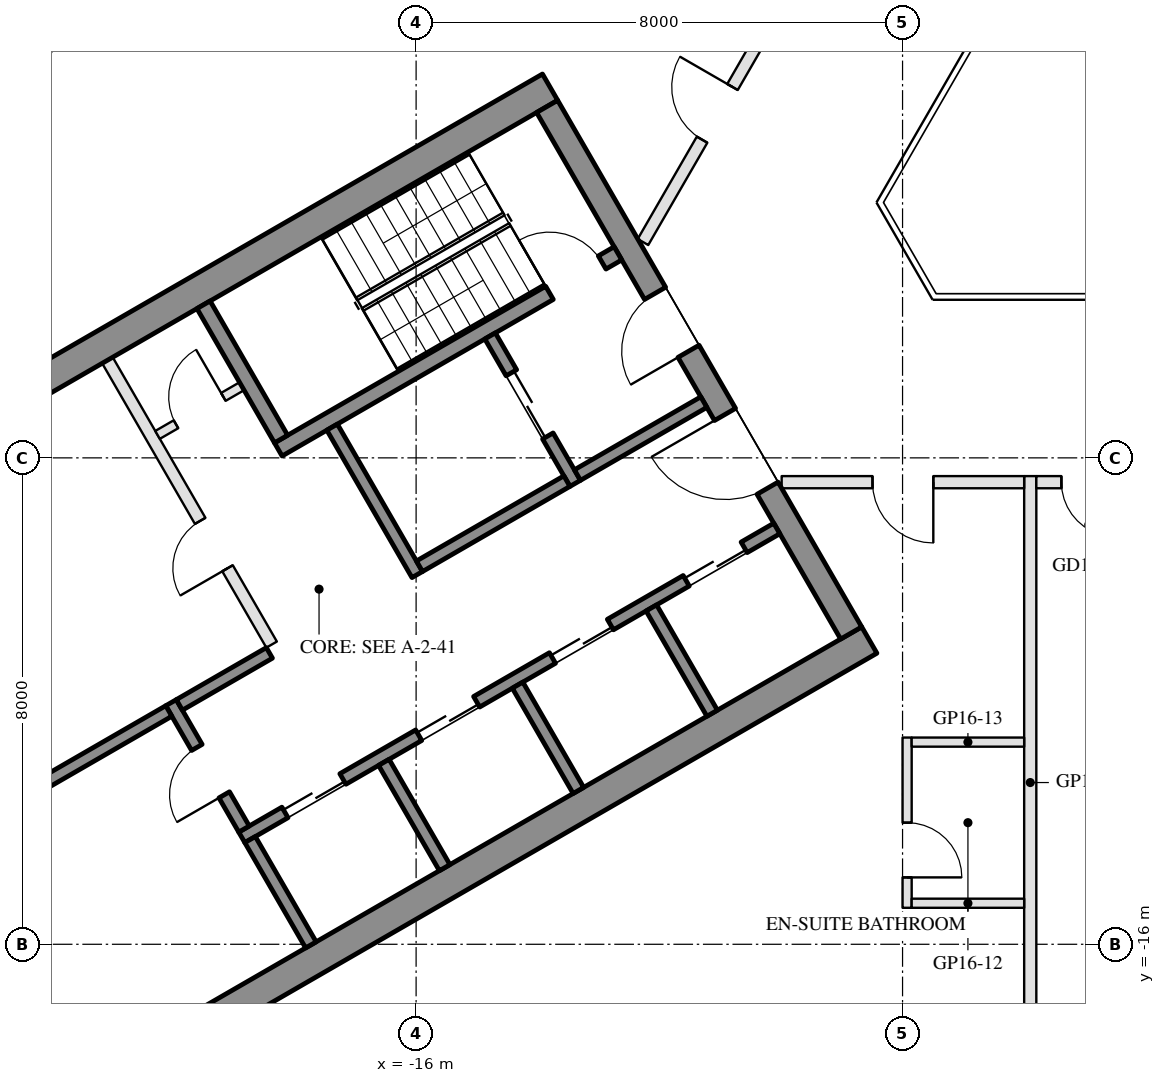
"""IFC4 building model, lengths in metres.
Left out: names, types, materials, properties, quantities, classifications, styles, units other than length and angle.
Written with IfcOpenShell. Run it as: python <this file> out.ifc"""

import sys

from ifc_helpers import new_model, si_unit, direction, frame, frame_2d, origin, place, context, subcontext, project, spatial, rectangle, extrude, element, fill, save


model = new_model("IFC4")
c1 = context("Model", 3, precision=1e-05, world=origin(), true_north=direction((0.0, 1.0)))
c2 = subcontext(c1, "Body", "Model", "MODEL_VIEW")
j1 = project(units=[si_unit("LENGTHUNIT", "METRE"), si_unit("PLANEANGLEUNIT", "RADIAN")], contexts=[c1])
p1 = place(None, origin())
s1 = spatial("IfcSite", under=j1, at=p1, CompositionType="ELEMENT")
p2 = place(p1, origin())
s2 = spatial("IfcBuilding", under=s1, at=p2, CompositionType="ELEMENT")
p3 = place(p2, frame((0.0, 0.0, 176.2)))
s3 = spatial("IfcBuildingStorey", under=s2, at=p3, CompositionType="ELEMENT", Elevation=176.2)
p4 = place(p3, frame((-20.309, 1.934, 0.0), z_axis=(0.0, 0.0, 1.0), x_axis=(-0.499992114976, -0.866029956157, 0.0)))
e1 = element("IfcWall", 1, at=p4, inside=s3, PredefinedType="SOLIDWALL", context=c2, shape_type="SweptSolid", body=[
    extrude(rectangle(XDim=6.74, YDim=0.35, at=frame_2d((3.37, 0.0))), origin(), (0.0, 0.0, 1.0), 3.55),
])
p5 = place(p4, frame((0.77, 0.0, 0.0)))
e2 = element("IfcOpeningElement", 2, at=p5, cuts=e1, PredefinedType="OPENING", context=c2, shape_type="SweptSolid", body=[
    extrude(rectangle(XDim=2.4, YDim=2.4, at=frame_2d((1.2, 1.2))), frame((0.0, 0.185, 0.0), z_axis=(0.0, -1.0, 0.0), x_axis=(1.0, 0.0, 0.0)), (0.0, 0.0, 1.0), 0.37),
])
p6 = place(p4, frame((3.47, 0.0, 0.3)))
e3 = element("IfcOpeningElement", 3, at=p6, cuts=e1, PredefinedType="OPENING", context=c2, shape_type="SweptSolid", body=[
    extrude(rectangle(XDim=2.9, YDim=2.65, at=frame_2d((1.45, 1.325))), frame((0.0, 0.185, 0.0), z_axis=(0.0, -1.0, 0.0), x_axis=(1.0, 0.0, 0.0)), (0.0, 0.0, 1.0), 0.37),
])
for number, where, z_axis, x_axis in (
    (4, (-13.797, -1.903, 0.0), (0.0, 0.0, 1.0), (-0.866, -0.5, 0.0)),
    (5, (-8.547, -10.997, 0.0), (0.0, 0.0, 1.0), (-0.866, -0.5, 0.0)),
):
    element("IfcWall", number, at=place(p3, frame(where, z_axis=z_axis, x_axis=x_axis)), inside=s3, PredefinedType="SHEAR", context=c2, shape_type="SweptSolid", body=[
        extrude(rectangle(XDim=14.837, YDim=0.5, at=frame_2d((7.418, 0.0))), origin(), (0.0, 0.0, 1.0), 3.5),
    ])
p7 = place(p3, frame((-13.845, -2.22, 0.0), z_axis=(0.0, 0.0, 1.0), x_axis=(0.500004234368, -0.866022959057, 0.0)))
e6 = element("IfcWall", 6, at=p7, inside=s3, PredefinedType="SHEAR", context=c2, shape_type="SweptSolid", body=[
    extrude(rectangle(XDim=10.0, YDim=0.4, at=frame_2d((5.0, 0.0))), origin(), (0.0, 0.0, 1.0), 3.5),
])
p8 = place(p7, frame((3.55, 0.0, 0.0)))
e7 = element("IfcOpeningElement", 7, at=p8, cuts=e6, PredefinedType="OPENING", context=c2, shape_type="SweptSolid", body=[
    extrude(rectangle(XDim=1.1, YDim=2.1, at=frame_2d((0.55, 1.05))), frame((0.0, 0.21, 0.0), z_axis=(0.0, -1.0, 0.0), x_axis=(1.0, 0.0, 0.0)), (0.0, 0.0, 1.0), 0.42),
])
p9 = place(p7, frame((5.85, 0.0, 0.0)))
e8 = element("IfcOpeningElement", 8, at=p9, cuts=e6, PredefinedType="OPENING", context=c2, shape_type="SweptSolid", body=[
    extrude(rectangle(XDim=1.4, YDim=2.1, at=frame_2d((0.7, 1.05))), frame((0.0, 0.21, 0.0), z_axis=(0.0, -1.0, 0.0), x_axis=(1.0, 0.0, 0.0)), (0.0, 0.0, 1.0), 0.42),
])
p10 = place(p3, frame((-12.681, -4.636, 0.0), z_axis=(0.0, 0.0, 1.0), x_axis=(-0.866021702275, -0.500006411147, 0.0)))
e9 = element("IfcWall", 9, at=p10, inside=s3, PredefinedType="SHEAR", context=c2, shape_type="SweptSolid", body=[
    extrude(rectangle(XDim=6.45, YDim=0.25, at=frame_2d((3.225, 0.0))), origin(), (0.0, 0.0, 1.0), 3.5),
])
p11 = place(p10, frame((0.3, 0.0, 0.0)))
e10 = element("IfcOpeningElement", 10, at=p11, cuts=e9, PredefinedType="OPENING", context=c2, shape_type="SweptSolid", body=[
    extrude(rectangle(XDim=1.0, YDim=2.1, at=frame_2d((0.5, 1.05))), frame((0.0, 0.135, 0.0), z_axis=(0.0, -1.0, 0.0), x_axis=(1.0, 0.0, 0.0)), (0.0, 0.0, 1.0), 0.27),
])
p12 = place(p3, frame((-19.496, -5.482, 0.0), z_axis=(0.0, 0.0, 1.0), x_axis=(0.499990435942, -0.866030925526, 0.0)))
e11 = element("IfcWall", 11, at=p12, inside=s3, PredefinedType="SHEAR", context=c2, shape_type="SweptSolid", body=[
    extrude(rectangle(XDim=2.55, YDim=0.25, at=frame_2d((1.275, 0.0))), origin(), (0.0, 0.0, 1.0), 3.5),
])
p13 = place(p3, frame((-17.381, -7.495, 0.0), z_axis=(0.0, 0.0, 1.0), x_axis=(0.500011755427, -0.866018616679, 0.0)))
e12 = element("IfcWall", 12, at=p13, inside=s3, PredefinedType="SHEAR", context=c2, shape_type="SweptSolid", body=[
    extrude(rectangle(XDim=2.8, YDim=0.2, at=frame_2d((1.4, 0.0))), origin(), (0.0, 0.0, 1.0), 3.5),
])
p14 = place(p3, frame((-14.783, -5.995, 0.0), z_axis=(0.0, 0.0, 1.0), x_axis=(0.49994636267, -0.866056369097, 0.0)))
e13 = element("IfcWall", 13, at=p14, inside=s3, PredefinedType="SHEAR", context=c2, shape_type="SweptSolid", body=[
    extrude(rectangle(XDim=2.8, YDim=0.2, at=frame_2d((1.4, 0.0))), origin(), (0.0, 0.0, 1.0), 3.5),
])
p15 = place(p14, frame((0.7, 0.0, 0.0)))
e14 = element("IfcOpeningElement", 14, at=p15, cuts=e13, PredefinedType="OPENING", context=c2, shape_type="SweptSolid", body=[
    extrude(rectangle(XDim=1.2, YDim=2.1, at=frame_2d((0.6, 1.05))), frame((0.0, 0.11, 0.0), z_axis=(0.0, -1.0, 0.0), x_axis=(1.0, 0.0, 0.0)), (0.0, 0.0, 1.0), 0.22),
])
p16 = place(p3, frame((-13.52, -8.383, 0.0), z_axis=(0.0, 0.0, 1.0), x_axis=(-0.866034573852, -0.49998411664, 0.0)))
e15 = element("IfcWall", 15, at=p16, inside=s3, PredefinedType="SHEAR", context=c2, shape_type="SweptSolid", body=[
    extrude(rectangle(XDim=2.8, YDim=0.2, at=frame_2d((1.4, 0.0))), origin(), (0.0, 0.0, 1.0), 3.5),
])
p17 = place(p3, frame((-11.268, -7.083, 0.0), z_axis=(0.0, 0.0, 1.0), x_axis=(-0.866050077142, -0.499957262057, 0.0)))
e16 = element("IfcWall", 16, at=p17, inside=s3, PredefinedType="SHEAR", context=c2, shape_type="SweptSolid", body=[
    extrude(rectangle(XDim=2.4, YDim=0.2, at=frame_2d((1.2, 0.0))), origin(), (0.0, 0.0, 1.0), 3.5),
])
p18 = place(p3, frame((-10.068, -9.162, 0.0), z_axis=(0.0, 0.0, 1.0), x_axis=(-0.866032725843, -0.499987317609, 0.0)))
e17 = element("IfcWall", 17, at=p18, inside=s3, PredefinedType="SHEAR", context=c2, shape_type="SweptSolid", body=[
    extrude(rectangle(XDim=10.16, YDim=0.2, at=frame_2d((5.08, 0.0))), origin(), (0.0, 0.0, 1.0), 3.5),
])
p19 = place(p18, frame((0.62, 0.0, 0.0)))
e18 = element("IfcOpeningElement", 18, at=p19, cuts=e17, PredefinedType="OPENING", context=c2, shape_type="SweptSolid", body=[
    extrude(rectangle(XDim=1.1, YDim=2.1, at=frame_2d((0.55, 1.05))), frame((0.0, 0.11, 0.0), z_axis=(0.0, -1.0, 0.0), x_axis=(1.0, 0.0, 0.0)), (0.0, 0.0, 1.0), 0.22),
])
p20 = place(p18, frame((3.16, 0.0, 0.0)))
e19 = element("IfcOpeningElement", 19, at=p20, cuts=e17, PredefinedType="OPENING", context=c2, shape_type="SweptSolid", body=[
    extrude(rectangle(XDim=1.1, YDim=2.1, at=frame_2d((0.55, 1.05))), frame((0.0, 0.11, 0.0), z_axis=(0.0, -1.0, 0.0), x_axis=(1.0, 0.0, 0.0)), (0.0, 0.0, 1.0), 0.22),
])
p21 = place(p18, frame((5.7, 0.0, 0.0)))
e20 = element("IfcOpeningElement", 20, at=p21, cuts=e17, PredefinedType="OPENING", context=c2, shape_type="SweptSolid", body=[
    extrude(rectangle(XDim=1.1, YDim=2.1, at=frame_2d((0.55, 1.05))), frame((0.0, 0.11, 0.0), z_axis=(0.0, -1.0, 0.0), x_axis=(1.0, 0.0, 0.0)), (0.0, 0.0, 1.0), 0.22),
])
p22 = place(p18, frame((8.24, 0.0, 0.0)))
e21 = element("IfcOpeningElement", 21, at=p22, cuts=e17, PredefinedType="OPENING", context=c2, shape_type="SweptSolid", body=[
    extrude(rectangle(XDim=1.1, YDim=2.1, at=frame_2d((0.55, 1.05))), frame((0.0, 0.11, 0.0), z_axis=(0.0, -1.0, 0.0), x_axis=(1.0, 0.0, 0.0)), (0.0, 0.0, 1.0), 0.22),
])
p23 = place(p3, frame((-20.031, -12.026, 0.0), z_axis=(0.0, 0.0, 1.0), x_axis=(0.500033551112, -0.866006032174, 0.0)))
e22 = element("IfcWall", 22, at=p23, inside=s3, PredefinedType="SHEAR", context=c2, shape_type="SweptSolid", body=[
    extrude(rectangle(XDim=2.4, YDim=0.2, at=frame_2d((1.2, 0.0))), origin(), (0.0, 0.0, 1.0), 3.5),
])
p24 = place(p23, frame((0.85, 0.0, 0.0)))
e23 = element("IfcOpeningElement", 23, at=p24, cuts=e22, PredefinedType="OPENING", context=c2, shape_type="SweptSolid", body=[
    extrude(rectangle(XDim=0.9, YDim=2.1, at=frame_2d((0.45, 1.05))), frame((0.0, 0.11, 0.0), z_axis=(0.0, -1.0, 0.0), x_axis=(1.0, 0.0, 0.0)), (0.0, 0.0, 1.0), 0.22),
])
p25 = place(p3, frame((-18.413, -11.208, 0.0), z_axis=(0.0, 0.0, 1.0), x_axis=(-0.866038183914, -0.499977863513, 0.0)))
e24 = element("IfcWall", 24, at=p25, inside=s3, PredefinedType="SHEAR", context=c2, shape_type="SweptSolid", body=[
    extrude(rectangle(XDim=1.71, YDim=0.2, at=frame_2d((0.855, 0.0))), origin(), (0.0, 0.0, 1.0), 3.5),
])
for number, where, z_axis, x_axis in (
    (25, (-12.131, -10.468, 0.0), (0.0, 0.0, 1.0), (0.5, -0.866, 0.0)),
    (26, (-14.331, -11.738, 0.0), (0.0, 0.0, 1.0), (0.5, -0.866, 0.0)),
    (27, (-16.531, -13.008, 0.0), (0.0, 0.0, 1.0), (0.5, -0.866, 0.0)),
    (28, (-18.73, -14.278, 0.0), (0.0, 0.0, 1.0), (0.5, -0.866, 0.0)),
):
    element("IfcWall", number, at=place(p3, frame(where, z_axis=z_axis, x_axis=x_axis)), inside=s3, PredefinedType="SHEAR", context=c2, shape_type="SweptSolid", body=[
        extrude(rectangle(XDim=2.0, YDim=0.2, at=frame_2d((1.0, 0.0))), origin(), (0.0, 0.0, 1.0), 3.5),
    ])
p26 = place(p3, frame((-20.067, -12.163, 0.0), z_axis=(0.0, 0.0, 1.0), x_axis=(-0.866055327414, -0.49994816717, 0.0)))
e29 = element("IfcWall", 29, at=p26, inside=s3, PredefinedType="SHEAR", context=c2, shape_type="SweptSolid", body=[
    extrude(rectangle(XDim=2.84, YDim=0.2, at=frame_2d((1.42, 0.0))), origin(), (0.0, 0.0, 1.0), 3.5),
])
p27 = place(p3, frame((-21.076, -6.395, 0.0), z_axis=(0.0, 0.0, 1.0), x_axis=(0.50001468107, -0.866016927499, 0.0)))
e30 = element("IfcWall", 30, at=p27, inside=s3, PredefinedType="PARTITIONING", context=c2, shape_type="SweptSolid", body=[
    extrude(rectangle(XDim=5.4, YDim=0.2, at=frame_2d((2.7, 0.0))), origin(), (0.0, 0.0, 1.0), 3.5),
])
p28 = place(p27, frame((3.05, 0.0, 0.0)))
e31 = element("IfcOpeningElement", 31, at=p28, cuts=e30, PredefinedType="OPENING", context=c2, shape_type="SweptSolid", body=[
    extrude(rectangle(XDim=0.9, YDim=2.1, at=frame_2d((0.45, 1.05))), frame((0.0, 0.11, 0.0), z_axis=(0.0, -1.0, 0.0), x_axis=(1.0, 0.0, 0.0)), (0.0, 0.0, 1.0), 0.22),
])
p29 = place(p3, frame((-18.866, -6.822, 0.0), z_axis=(0.0, 0.0, 1.0), x_axis=(-0.866028054938, -0.499995408039, 0.0)))
e32 = element("IfcWall", 32, at=p29, inside=s3, PredefinedType="PARTITIONING", context=c2, shape_type="SweptSolid", body=[
    extrude(rectangle(XDim=1.6, YDim=0.15, at=frame_2d((0.8, 0.0))), origin(), (0.0, 0.0, 1.0), 3.5),
])
p30 = place(p29, frame((0.35, 0.0, 0.0)))
e33 = element("IfcOpeningElement", 33, at=p30, cuts=e32, PredefinedType="OPENING", context=c2, shape_type="SweptSolid", body=[
    extrude(rectangle(XDim=0.9, YDim=2.1, at=frame_2d((0.45, 1.05))), frame((0.0, 0.085, 0.0), z_axis=(0.0, -1.0, 0.0), x_axis=(1.0, 0.0, 0.0)), (0.0, 0.0, 1.0), 0.17),
])
p31 = place(p3, frame((-5.9, -18.38, 0.0), z_axis=(0.0, 0.0, 1.0), x_axis=(0.0, 1.0, 0.0)))
e34 = element("IfcWall", 34, at=p31, inside=s3, PredefinedType="PARTITIONING", context=c2, shape_type="SweptSolid", body=[
    extrude(rectangle(XDim=10.08, YDim=0.2, at=frame_2d((5.04, 0.0))), origin(), (0.0, 0.0, 1.0), 3.06),
])
p32 = place(p3, frame((-6.0, -8.4, 0.0), z_axis=(0.0, 0.0, 1.0), x_axis=(-1.0, 0.0, 0.0)))
e35 = element("IfcWall", 35, at=p32, inside=s3, PredefinedType="PARTITIONING", context=c2, shape_type="SweptSolid", body=[
    extrude(rectangle(XDim=3.988, YDim=0.2, at=frame_2d((1.994, 0.0))), origin(), (0.0, 0.0, 1.0), 2.95),
])
p33 = place(p32, frame((1.494, 0.0, 0.0)))
e36 = element("IfcOpeningElement", 36, at=p33, cuts=e35, PredefinedType="OPENING", context=c2, shape_type="SweptSolid", body=[
    extrude(rectangle(XDim=1.0, YDim=2.1, at=frame_2d((0.5, 1.05))), frame((0.0, 0.11, 0.0), z_axis=(0.0, -1.0, 0.0), x_axis=(1.0, 0.0, 0.0)), (0.0, 0.0, 1.0), 0.22),
])
p34 = place(p3, frame((-7.925, -12.6, 0.0), z_axis=(0.0, 0.0, 1.0), x_axis=(0.0, -1.0, 0.0)))
e37 = element("IfcWall", 37, at=p34, inside=s3, PredefinedType="PARTITIONING", context=c2, shape_type="SweptSolid", body=[
    extrude(rectangle(XDim=2.8, YDim=0.15, at=frame_2d((1.4, 0.0))), origin(), (0.0, 0.0, 1.0), 2.95),
])
p35 = place(p34, frame((1.4, 0.0, 0.0)))
e38 = element("IfcOpeningElement", 38, at=p35, cuts=e37, PredefinedType="OPENING", context=c2, shape_type="SweptSolid", body=[
    extrude(rectangle(XDim=0.9, YDim=2.1, at=frame_2d((0.45, 1.05))), frame((0.0, 0.085, 0.0), z_axis=(0.0, -1.0, 0.0), x_axis=(1.0, 0.0, 0.0)), (0.0, 0.0, 1.0), 0.17),
])
for number, where, z_axis, x_axis in (
    (39, (-7.85, -15.325, 0.0), (0.0, 0.0, 1.0), (1.0, 0.0, 0.0)),
    (40, (-7.85, -12.675, 0.0), (0.0, 0.0, 1.0), (1.0, 0.0, 0.0)),
):
    element("IfcWall", number, at=place(p3, frame(where, z_axis=z_axis, x_axis=x_axis)), inside=s3, PredefinedType="PARTITIONING", context=c2, shape_type="SweptSolid", body=[
        extrude(rectangle(XDim=1.85, YDim=0.15, at=frame_2d((0.925, 0.0))), origin(), (0.0, 0.0, 1.0), 2.95),
    ])
p36 = place(p3, frame((-4.075, -8.4, 0.0), z_axis=(0.0, 0.0, 1.0), x_axis=(-1.0, 0.0, 0.0)))
e41 = element("IfcWall", 41, at=p36, inside=s3, PredefinedType="PARTITIONING", context=c2, shape_type="SweptSolid", body=[
    extrude(rectangle(XDim=1.725, YDim=0.2, at=frame_2d((0.863, 0.0))), origin(), (0.0, 0.0, 1.0), 3.55),
])
p37 = place(p36, frame((0.413, 0.0, 0.0)))
e42 = element("IfcOpeningElement", 42, at=p37, cuts=e41, PredefinedType="OPENING", context=c2, shape_type="SweptSolid", body=[
    extrude(rectangle(XDim=0.9, YDim=2.1, at=frame_2d((0.45, 1.05))), frame((0.0, 0.11, 0.0), z_axis=(0.0, -1.0, 0.0), x_axis=(1.0, 0.0, 0.0)), (0.0, 0.0, 1.0), 0.22),
])
p38 = place(p3, frame((-12.269, -4.45, 0.0), z_axis=(0.0, 0.0, 1.0), x_axis=(0.500012125002, 0.866018403298, 0.0)))
e43 = element("IfcWall", 43, at=p38, inside=s3, PredefinedType="PARTITIONING", context=c2, shape_type="SweptSolid", body=[
    extrude(rectangle(XDim=4.888, YDim=0.2, at=frame_2d((2.444, 0.0))), origin(), (0.0, 0.0, 1.0), 2.95),
])
p39 = place(p38, frame((1.944, 0.0, 0.0)))
e44 = element("IfcOpeningElement", 44, at=p39, cuts=e43, PredefinedType="OPENING", context=c2, shape_type="SweptSolid", body=[
    extrude(rectangle(XDim=1.0, YDim=2.1, at=frame_2d((0.5, 1.05))), frame((0.0, 0.11, 0.0), z_axis=(0.0, -1.0, 0.0), x_axis=(1.0, 0.0, 0.0)), (0.0, 0.0, 1.0), 0.22),
])
p40 = place(p15, origin())
e45 = element("IfcDoor", 45, at=p40, inside=s3, OperationType="DOUBLE_DOOR_SLIDING", PredefinedType="DOOR", context=c2, shape_type="SweptSolid", body=[
    extrude(rectangle(XDim=1.2, YDim=2.1, at=frame_2d((0.6, 1.05))), frame((0.0, 0.025, 0.0), z_axis=(0.0, -1.0, 0.0), x_axis=(1.0, 0.0, 0.0)), (0.0, 0.0, 1.0), 0.05),
])
fill(e14, e45)
p41 = place(p30, frame((0.9, 0.0, 0.0), z_axis=(0.0, 0.0, 1.0), x_axis=(-1.0, 0.0, 0.0)))
e46 = element("IfcDoor", 46, at=p41, inside=s3, OperationType="SINGLE_SWING_RIGHT", PredefinedType="DOOR", context=c2, shape_type="SweptSolid", body=[
    extrude(rectangle(XDim=0.9, YDim=2.1, at=frame_2d((0.45, 1.05))), frame((0.0, 0.025, 0.0), z_axis=(0.0, -1.0, 0.0), x_axis=(1.0, 0.0, 0.0)), (0.0, 0.0, 1.0), 0.05),
])
fill(e33, e46)
p42 = place(p19, origin())
e47 = element("IfcDoor", 47, at=p42, inside=s3, OperationType="DOUBLE_DOOR_SLIDING", PredefinedType="DOOR", context=c2, shape_type="SweptSolid", body=[
    extrude(rectangle(XDim=1.1, YDim=2.1, at=frame_2d((0.55, 1.05))), frame((0.0, 0.025, 0.0), z_axis=(0.0, -1.0, 0.0), x_axis=(1.0, 0.0, 0.0)), (0.0, 0.0, 1.0), 0.05),
])
fill(e18, e47)
p43 = place(p20, origin())
e48 = element("IfcDoor", 48, at=p43, inside=s3, OperationType="DOUBLE_DOOR_SLIDING", PredefinedType="DOOR", context=c2, shape_type="SweptSolid", body=[
    extrude(rectangle(XDim=1.1, YDim=2.1, at=frame_2d((0.55, 1.05))), frame((0.0, 0.025, 0.0), z_axis=(0.0, -1.0, 0.0), x_axis=(1.0, 0.0, 0.0)), (0.0, 0.0, 1.0), 0.05),
])
fill(e19, e48)
p44 = place(p21, origin())
e49 = element("IfcDoor", 49, at=p44, inside=s3, OperationType="DOUBLE_DOOR_SLIDING", PredefinedType="DOOR", context=c2, shape_type="SweptSolid", body=[
    extrude(rectangle(XDim=1.1, YDim=2.1, at=frame_2d((0.55, 1.05))), frame((0.0, 0.025, 0.0), z_axis=(0.0, -1.0, 0.0), x_axis=(1.0, 0.0, 0.0)), (0.0, 0.0, 1.0), 0.05),
])
fill(e20, e49)
p45 = place(p22, origin())
e50 = element("IfcDoor", 50, at=p45, inside=s3, OperationType="DOUBLE_DOOR_SLIDING", PredefinedType="DOOR", context=c2, shape_type="SweptSolid", body=[
    extrude(rectangle(XDim=1.1, YDim=2.1, at=frame_2d((0.55, 1.05))), frame((0.0, 0.025, 0.0), z_axis=(0.0, -1.0, 0.0), x_axis=(1.0, 0.0, 0.0)), (0.0, 0.0, 1.0), 0.05),
])
fill(e21, e50)
p46 = place(p24, frame((0.9, 0.0, 0.0), z_axis=(0.0, 0.0, 1.0), x_axis=(-1.0, 0.0, 0.0)))
e51 = element("IfcDoor", 51, at=p46, inside=s3, OperationType="SINGLE_SWING_LEFT", PredefinedType="DOOR", context=c2, shape_type="SweptSolid", body=[
    extrude(rectangle(XDim=0.9, YDim=2.1, at=frame_2d((0.45, 1.05))), frame((0.0, 0.025, 0.0), z_axis=(0.0, -1.0, 0.0), x_axis=(1.0, 0.0, 0.0)), (0.0, 0.0, 1.0), 0.05),
])
fill(e23, e51)
p47 = place(p28, frame((0.9, 0.0, 0.0), z_axis=(0.0, 0.0, 1.0), x_axis=(-1.0, 0.0, 0.0)))
e52 = element("IfcDoor", 52, at=p47, inside=s3, OperationType="SINGLE_SWING_LEFT", PredefinedType="DOOR", context=c2, shape_type="SweptSolid", body=[
    extrude(rectangle(XDim=0.9, YDim=2.1, at=frame_2d((0.45, 1.05))), frame((0.0, 0.025, 0.0), z_axis=(0.0, -1.0, 0.0), x_axis=(1.0, 0.0, 0.0)), (0.0, 0.0, 1.0), 0.05),
])
fill(e31, e52)
p48 = place(p8, frame((1.1, 0.0, 0.0), z_axis=(0.0, 0.0, 1.0), x_axis=(-1.0, 0.0, 0.0)))
e53 = element("IfcDoor", 53, at=p48, inside=s3, OperationType="SINGLE_SWING_LEFT", PredefinedType="DOOR", context=c2, shape_type="SweptSolid", body=[
    extrude(rectangle(XDim=1.1, YDim=2.1, at=frame_2d((0.55, 1.05))), frame((0.0, 0.025, 0.0), z_axis=(0.0, -1.0, 0.0), x_axis=(1.0, 0.0, 0.0)), (0.0, 0.0, 1.0), 0.05),
])
fill(e7, e53)
p49 = place(p9, frame((1.4, 0.0, 0.0), z_axis=(0.0, 0.0, 1.0), x_axis=(-1.0, 0.0, 0.0)))
e54 = element("IfcDoor", 54, at=p49, inside=s3, OperationType="DOUBLE_DOOR_SINGLE_SWING", PredefinedType="DOOR", context=c2, shape_type="SweptSolid", body=[
    extrude(rectangle(XDim=1.4, YDim=2.1, at=frame_2d((0.7, 1.05))), frame((0.0, 0.025, 0.0), z_axis=(0.0, -1.0, 0.0), x_axis=(1.0, 0.0, 0.0)), (0.0, 0.0, 1.0), 0.05),
])
fill(e8, e54)
p50 = place(p11, frame((1.0, 0.0, 0.0), z_axis=(0.0, 0.0, 1.0), x_axis=(-1.0, 0.0, 0.0)))
e55 = element("IfcDoor", 55, at=p50, inside=s3, OperationType="SINGLE_SWING_LEFT", PredefinedType="DOOR", context=c2, shape_type="SweptSolid", body=[
    extrude(rectangle(XDim=1.0, YDim=2.1, at=frame_2d((0.5, 1.05))), frame((0.0, 0.025, 0.0), z_axis=(0.0, -1.0, 0.0), x_axis=(1.0, 0.0, 0.0)), (0.0, 0.0, 1.0), 0.05),
])
fill(e10, e55)
p51 = place(p35, origin())
e56 = element("IfcDoor", 56, at=p51, inside=s3, OperationType="SINGLE_SWING_RIGHT", PredefinedType="DOOR", context=c2, shape_type="SweptSolid", body=[
    extrude(rectangle(XDim=0.9, YDim=2.1, at=frame_2d((0.45, 1.05))), frame((0.0, 0.025, 0.0), z_axis=(0.0, -1.0, 0.0), x_axis=(1.0, 0.0, 0.0)), (0.0, 0.0, 1.0), 0.05),
])
fill(e38, e56)
p52 = place(p33, origin())
e57 = element("IfcDoor", 57, at=p52, inside=s3, OperationType="SINGLE_SWING_LEFT", PredefinedType="DOOR", context=c2, shape_type="SweptSolid", body=[
    extrude(rectangle(XDim=1.0, YDim=2.1, at=frame_2d((0.5, 1.05))), frame((0.0, 0.025, 0.0), z_axis=(0.0, -1.0, 0.0), x_axis=(1.0, 0.0, 0.0)), (0.0, 0.0, 1.0), 0.05),
])
fill(e36, e57)
p53 = place(p37, origin())
e58 = element("IfcDoor", 58, at=p53, inside=s3, OperationType="SINGLE_SWING_LEFT", PredefinedType="DOOR", context=c2, shape_type="SweptSolid", body=[
    extrude(rectangle(XDim=0.9, YDim=2.1, at=frame_2d((0.45, 1.05))), frame((0.0, 0.025, 0.0), z_axis=(0.0, -1.0, 0.0), x_axis=(1.0, 0.0, 0.0)), (0.0, 0.0, 1.0), 0.05),
])
fill(e42, e58)
p54 = place(p39, origin())
e59 = element("IfcDoor", 59, at=p54, inside=s3, OperationType="SINGLE_SWING_RIGHT", PredefinedType="DOOR", context=c2, shape_type="SweptSolid", body=[
    extrude(rectangle(XDim=1.0, YDim=2.1, at=frame_2d((0.5, 1.05))), frame((0.0, 0.025, 0.0), z_axis=(0.0, -1.0, 0.0), x_axis=(1.0, 0.0, 0.0)), (0.0, 0.0, 1.0), 0.05),
])
fill(e44, e59)
save(model, sys.argv[1])
